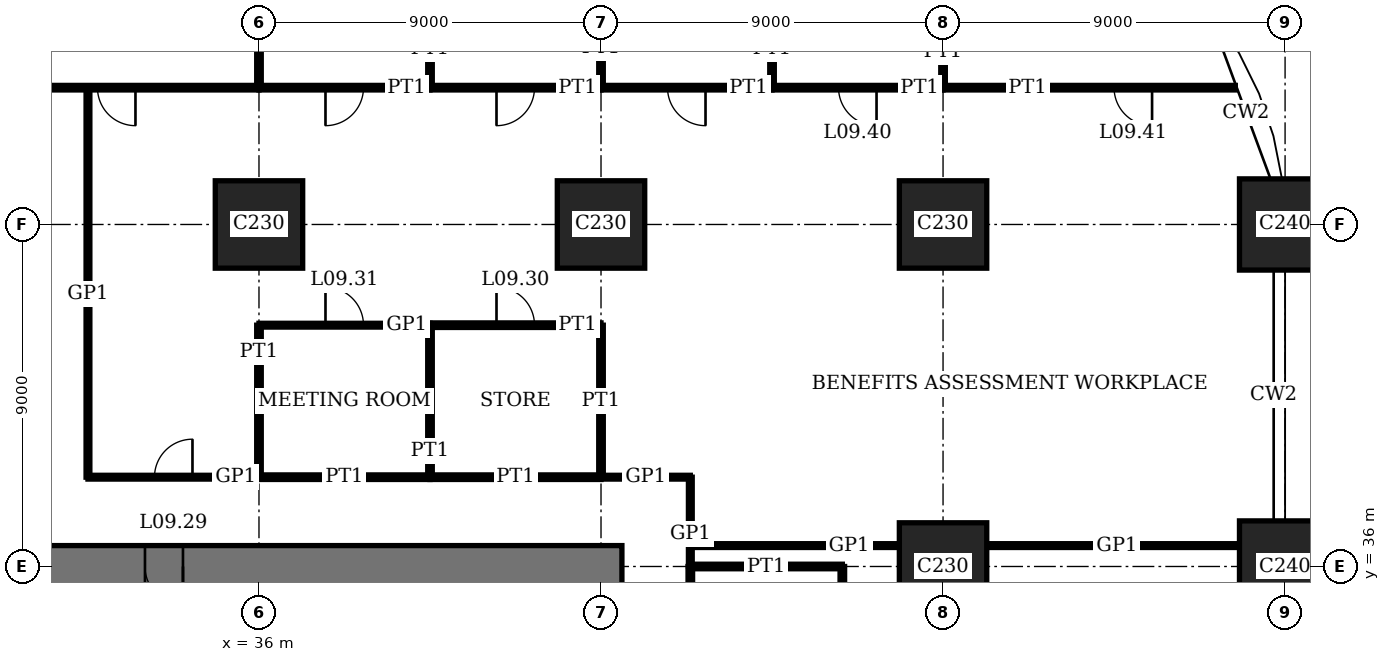
"""IFC4 building model, lengths in metres.
Left out: names, types, materials, properties, quantities, classifications, styles, units other than length and angle.
Written with IfcOpenShell. Run it as: python <this file> out.ifc"""

import sys

from ifc_helpers import new_model, si_unit, direction, frame, frame_2d, origin, origin_2d, place, context, subcontext, project, spatial, rectangle, extrude, element, fill, save


model = new_model("IFC4")
c1 = context("Model", 3, precision=1e-05, world=origin(), true_north=direction((0.0, 1.0)))
c2 = subcontext(c1, "Body", "Model", "MODEL_VIEW")
j1 = project(units=[si_unit("LENGTHUNIT", "METRE"), si_unit("PLANEANGLEUNIT", "RADIAN")], contexts=[c1])
p1 = place(None, origin())
s1 = spatial("IfcSite", under=j1, at=p1, CompositionType="ELEMENT")
p2 = place(p1, origin())
s2 = spatial("IfcBuilding", under=s1, at=p2, CompositionType="ELEMENT")
p3 = place(p2, frame((0.0, 0.0, 39.8)))
s3 = spatial("IfcBuildingStorey", under=s2, at=p3, CompositionType="ELEMENT", Elevation=39.8)
for number, where, z_axis, x_axis in (
    (1, (36.0, 45.0, 0.0), (0.0, 0.0, 1.0), (1.0, 0.0, 0.0)),
    (2, (45.0, 45.0, 0.0), (0.0, 0.0, 1.0), (1.0, 0.0, 0.0)),
    (3, (54.0, 36.0, 0.0), (0.0, 0.0, 1.0), (1.0, 0.0, 0.0)),
    (4, (54.0, 45.0, 0.0), (0.0, 0.0, 1.0), (1.0, 0.0, 0.0)),
):
    element("IfcColumn", number, at=place(p3, frame(where, z_axis=z_axis, x_axis=x_axis)), inside=s3, PredefinedType="COLUMN", context=c2, shape_type="SweptSolid", body=[
        extrude(rectangle(XDim=2.3, YDim=2.3, at=origin_2d()), origin(), (0.0, 0.0, 1.0), 4.0),
    ])
for number, where, z_axis, x_axis in (
    (5, (63.0, 36.0, 0.0), (0.0, 0.0, 1.0), (1.0, 0.0, 0.0)),
    (6, (63.0, 45.0, 0.0), (0.0, 0.0, 1.0), (1.0, 0.0, 0.0)),
):
    element("IfcColumn", number, at=place(p3, frame(where, z_axis=z_axis, x_axis=x_axis)), inside=s3, PredefinedType="COLUMN", context=c2, shape_type="SweptSolid", body=[
        extrude(rectangle(XDim=2.4, YDim=2.4, at=origin_2d()), origin(), (0.0, 0.0, 1.0), 4.0),
    ])
p4 = place(p3, frame((45.55, 36.0, 0.0), z_axis=(0.0, 0.0, 1.0), x_axis=(-1.0, 0.0, 0.0)))
e7 = element("IfcWall", 7, at=p4, inside=s3, PredefinedType="SHEAR", context=c2, shape_type="SweptSolid", body=[
    extrude(rectangle(XDim=28.1, YDim=1.1, at=frame_2d((14.05, 0.0))), origin(), (0.0, 0.0, 1.0), 4.0),
])
p5 = place(p4, frame((11.55, 0.0, 0.0)))
e8 = element("IfcOpeningElement", 8, at=p5, cuts=e7, PredefinedType="OPENING", context=c2, shape_type="SweptSolid", body=[
    extrude(rectangle(XDim=1.0, YDim=2.4, at=frame_2d((0.5, 1.2))), frame((0.0, 0.56, 0.0), z_axis=(0.0, -1.0, 0.0), x_axis=(1.0, 0.0, 0.0)), (0.0, 0.0, 1.0), 1.12),
])
p6 = place(p4, frame((16.55, 0.0, 0.0)))
e9 = element("IfcOpeningElement", 9, at=p6, cuts=e7, PredefinedType="OPENING", context=c2, shape_type="SweptSolid", body=[
    extrude(rectangle(XDim=1.0, YDim=2.4, at=frame_2d((0.5, 1.2))), frame((0.0, 0.56, 0.0), z_axis=(0.0, -1.0, 0.0), x_axis=(1.0, 0.0, 0.0)), (0.0, 0.0, 1.0), 1.12),
])
p7 = place(p4, frame((20.0, 0.0, 0.0)))
e10 = element("IfcOpeningElement", 10, at=p7, cuts=e7, PredefinedType="OPENING", context=c2, shape_type="SweptSolid", body=[
    extrude(rectangle(XDim=1.1, YDim=2.4, at=frame_2d((0.55, 1.2))), frame((0.0, 0.56, 0.0), z_axis=(0.0, -1.0, 0.0), x_axis=(1.0, 0.0, 0.0)), (0.0, 0.0, 1.0), 1.12),
])
p8 = place(p4, frame((24.05, 0.0, 0.0)))
e11 = element("IfcOpeningElement", 11, at=p8, cuts=e7, PredefinedType="OPENING", context=c2, shape_type="SweptSolid", body=[
    extrude(rectangle(XDim=1.0, YDim=2.4, at=frame_2d((0.5, 1.2))), frame((0.0, 0.56, 0.0), z_axis=(0.0, -1.0, 0.0), x_axis=(1.0, 0.0, 0.0)), (0.0, 0.0, 1.0), 1.12),
])
p9 = place(p3, frame((47.35, 36.0, 0.0), z_axis=(0.0, 0.0, 1.0), x_axis=(1.0, 0.0, 0.0)))
e12 = element("IfcWall", 12, at=p9, inside=s3, PredefinedType="PARTITIONING", context=c2, shape_type="SweptSolid", body=[
    extrude(rectangle(XDim=4.0, YDim=0.12, at=frame_2d((2.0, 0.0))), origin(), (0.0, 0.0, 1.0), 3.05),
])
p10 = place(p3, frame((47.35, 36.55, 0.0), z_axis=(0.0, 0.0, 1.0), x_axis=(1.0, 0.0, 0.0)))
e13 = element("IfcWall", 13, at=p10, inside=s3, PredefinedType="PARTITIONING", context=c2, shape_type="SweptSolid", body=[
    extrude(rectangle(XDim=5.5, YDim=0.1, at=frame_2d((2.75, 0.0))), origin(), (0.0, 0.0, 1.0), 3.75),
])
p11 = place(p3, frame((55.15, 36.55, 0.0), z_axis=(0.0, 0.0, 1.0), x_axis=(1.0, 0.0, 0.0)))
e14 = element("IfcWall", 14, at=p11, inside=s3, PredefinedType="PARTITIONING", context=c2, shape_type="SweptSolid", body=[
    extrude(rectangle(XDim=6.65, YDim=0.1, at=frame_2d((3.325, 0.0))), origin(), (0.0, 0.0, 1.0), 3.75),
])
for number, where, z_axis, x_axis in (
    (15, (36.0, 38.35, 0.0), (0.0, 0.0, 1.0), (1.0, 0.0, 0.0)),
    (16, (40.5, 38.35, 0.0), (0.0, 0.0, 1.0), (1.0, 0.0, 0.0)),
):
    element("IfcWall", number, at=place(p3, frame(where, z_axis=z_axis, x_axis=x_axis)), inside=s3, PredefinedType="PARTITIONING", context=c2, shape_type="SweptSolid", body=[
        extrude(rectangle(XDim=4.5, YDim=0.12, at=frame_2d((2.25, 0.0))), origin(), (0.0, 0.0, 1.0), 3.75),
    ])
p12 = place(p3, frame((31.5, 38.35, 0.0), z_axis=(0.0, 0.0, 1.0), x_axis=(1.0, 0.0, 0.0)))
e17 = element("IfcWall", 17, at=p12, inside=s3, PredefinedType="PARTITIONING", context=c2, shape_type="SweptSolid", body=[
    extrude(rectangle(XDim=4.5, YDim=0.1, at=frame_2d((2.25, 0.0))), origin(), (0.0, 0.0, 1.0), 3.75),
])
p13 = place(p12, frame((1.75, 0.0, 0.0)))
e18 = element("IfcOpeningElement", 18, at=p13, cuts=e17, PredefinedType="OPENING", context=c2, shape_type="SweptSolid", body=[
    extrude(rectangle(XDim=1.0, YDim=2.4, at=frame_2d((0.5, 1.2))), frame((0.0, 0.06, 0.0), z_axis=(0.0, -1.0, 0.0), x_axis=(1.0, 0.0, 0.0)), (0.0, 0.0, 1.0), 0.12),
])
p14 = place(p3, frame((45.0, 38.35, 0.0), z_axis=(0.0, 0.0, 1.0), x_axis=(1.0, 0.0, 0.0)))
e19 = element("IfcWall", 19, at=p14, inside=s3, PredefinedType="PARTITIONING", context=c2, shape_type="SweptSolid", body=[
    extrude(rectangle(XDim=2.35, YDim=0.1, at=frame_2d((1.175, 0.0))), origin(), (0.0, 0.0, 1.0), 3.75),
])
p15 = place(p3, frame((40.5, 42.35, 0.0), z_axis=(0.0, 0.0, 1.0), x_axis=(1.0, 0.0, 0.0)))
e20 = element("IfcWall", 20, at=p15, inside=s3, PredefinedType="PARTITIONING", context=c2, shape_type="SweptSolid", body=[
    extrude(rectangle(XDim=4.5, YDim=0.12, at=frame_2d((2.25, 0.0))), origin(), (0.0, 0.0, 1.0), 3.75),
])
p16 = place(p15, frame((1.75, 0.0, 0.0)))
e21 = element("IfcOpeningElement", 21, at=p16, cuts=e20, PredefinedType="OPENING", context=c2, shape_type="SweptSolid", body=[
    extrude(rectangle(XDim=1.0, YDim=2.4, at=frame_2d((0.5, 1.2))), frame((0.0, 0.07, 0.0), z_axis=(0.0, -1.0, 0.0), x_axis=(1.0, 0.0, 0.0)), (0.0, 0.0, 1.0), 0.14),
])
p17 = place(p3, frame((36.0, 42.35, 0.0), z_axis=(0.0, 0.0, 1.0), x_axis=(1.0, 0.0, 0.0)))
e22 = element("IfcWall", 22, at=p17, inside=s3, PredefinedType="PARTITIONING", context=c2, shape_type="SweptSolid", body=[
    extrude(rectangle(XDim=4.5, YDim=0.1, at=frame_2d((2.25, 0.0))), origin(), (0.0, 0.0, 1.0), 3.75),
])
p18 = place(p17, frame((1.75, 0.0, 0.0)))
e23 = element("IfcOpeningElement", 23, at=p18, cuts=e22, PredefinedType="OPENING", context=c2, shape_type="SweptSolid", body=[
    extrude(rectangle(XDim=1.0, YDim=2.4, at=frame_2d((0.5, 1.2))), frame((0.0, 0.06, 0.0), z_axis=(0.0, -1.0, 0.0), x_axis=(1.0, 0.0, 0.0)), (0.0, 0.0, 1.0), 0.12),
])
p19 = place(p3, frame((27.0, 48.6, 0.0), z_axis=(0.0, 0.0, 1.0), x_axis=(1.0, 0.0, 0.0)))
e24 = element("IfcWall", 24, at=p19, inside=s3, PredefinedType="PARTITIONING", context=c2, shape_type="SweptSolid", body=[
    extrude(rectangle(XDim=9.0, YDim=0.12, at=frame_2d((4.5, 0.0))), origin(), (0.0, 0.0, 1.0), 3.75),
])
p20 = place(p19, frame((4.75, 0.0, 0.0)))
e25 = element("IfcOpeningElement", 25, at=p20, cuts=e24, PredefinedType="OPENING", context=c2, shape_type="SweptSolid", body=[
    extrude(rectangle(XDim=1.0, YDim=2.4, at=frame_2d((0.5, 1.2))), frame((0.0, 0.07, 0.0), z_axis=(0.0, -1.0, 0.0), x_axis=(1.0, 0.0, 0.0)), (0.0, 0.0, 1.0), 0.14),
])
p21 = place(p3, frame((36.0, 48.6, 0.0), z_axis=(0.0, 0.0, 1.0), x_axis=(1.0, 0.0, 0.0)))
e26 = element("IfcWall", 26, at=p21, inside=s3, PredefinedType="PARTITIONING", context=c2, shape_type="SweptSolid", body=[
    extrude(rectangle(XDim=4.5, YDim=0.12, at=frame_2d((2.25, 0.0))), origin(), (0.0, 0.0, 1.0), 3.75),
])
p22 = place(p21, frame((1.75, 0.0, 0.0)))
e27 = element("IfcOpeningElement", 27, at=p22, cuts=e26, PredefinedType="OPENING", context=c2, shape_type="SweptSolid", body=[
    extrude(rectangle(XDim=1.0, YDim=2.4, at=frame_2d((0.5, 1.2))), frame((0.0, 0.07, 0.0), z_axis=(0.0, -1.0, 0.0), x_axis=(1.0, 0.0, 0.0)), (0.0, 0.0, 1.0), 0.14),
])
p23 = place(p3, frame((40.5, 48.6, 0.0), z_axis=(0.0, 0.0, 1.0), x_axis=(1.0, 0.0, 0.0)))
e28 = element("IfcWall", 28, at=p23, inside=s3, PredefinedType="PARTITIONING", context=c2, shape_type="SweptSolid", body=[
    extrude(rectangle(XDim=4.5, YDim=0.12, at=frame_2d((2.25, 0.0))), origin(), (0.0, 0.0, 1.0), 3.75),
])
p24 = place(p23, frame((1.75, 0.0, 0.0)))
e29 = element("IfcOpeningElement", 29, at=p24, cuts=e28, PredefinedType="OPENING", context=c2, shape_type="SweptSolid", body=[
    extrude(rectangle(XDim=1.0, YDim=2.4, at=frame_2d((0.5, 1.2))), frame((0.0, 0.07, 0.0), z_axis=(0.0, -1.0, 0.0), x_axis=(1.0, 0.0, 0.0)), (0.0, 0.0, 1.0), 0.14),
])
p25 = place(p3, frame((45.0, 48.6, 0.0), z_axis=(0.0, 0.0, 1.0), x_axis=(1.0, 0.0, 0.0)))
e30 = element("IfcWall", 30, at=p25, inside=s3, PredefinedType="PARTITIONING", context=c2, shape_type="SweptSolid", body=[
    extrude(rectangle(XDim=4.5, YDim=0.12, at=frame_2d((2.25, 0.0))), origin(), (0.0, 0.0, 1.0), 3.75),
])
p26 = place(p25, frame((1.75, 0.0, 0.0)))
e31 = element("IfcOpeningElement", 31, at=p26, cuts=e30, PredefinedType="OPENING", context=c2, shape_type="SweptSolid", body=[
    extrude(rectangle(XDim=1.0, YDim=2.4, at=frame_2d((0.5, 1.2))), frame((0.0, 0.07, 0.0), z_axis=(0.0, -1.0, 0.0), x_axis=(1.0, 0.0, 0.0)), (0.0, 0.0, 1.0), 0.14),
])
p27 = place(p3, frame((49.5, 48.6, 0.0), z_axis=(0.0, 0.0, 1.0), x_axis=(1.0, 0.0, 0.0)))
e32 = element("IfcWall", 32, at=p27, inside=s3, PredefinedType="PARTITIONING", context=c2, shape_type="SweptSolid", body=[
    extrude(rectangle(XDim=4.5, YDim=0.12, at=frame_2d((2.25, 0.0))), origin(), (0.0, 0.0, 1.0), 3.75),
])
p28 = place(p27, frame((1.75, 0.0, 0.0)))
e33 = element("IfcOpeningElement", 33, at=p28, cuts=e32, PredefinedType="OPENING", context=c2, shape_type="SweptSolid", body=[
    extrude(rectangle(XDim=1.0, YDim=2.4, at=frame_2d((0.5, 1.2))), frame((0.0, 0.07, 0.0), z_axis=(0.0, -1.0, 0.0), x_axis=(1.0, 0.0, 0.0)), (0.0, 0.0, 1.0), 0.14),
])
p29 = place(p3, frame((54.0, 48.6, 0.0), z_axis=(0.0, 0.0, 1.0), x_axis=(1.0, 0.0, 0.0)))
e34 = element("IfcWall", 34, at=p29, inside=s3, PredefinedType="PARTITIONING", context=c2, shape_type="SweptSolid", body=[
    extrude(rectangle(XDim=7.69, YDim=0.12, at=frame_2d((3.845, 0.0))), origin(), (0.0, 0.0, 1.0), 3.75),
])
p30 = place(p29, frame((4.5, 0.0, 0.0)))
e35 = element("IfcOpeningElement", 35, at=p30, cuts=e34, PredefinedType="OPENING", context=c2, shape_type="SweptSolid", body=[
    extrude(rectangle(XDim=1.0, YDim=2.4, at=frame_2d((0.5, 1.2))), frame((0.0, 0.07, 0.0), z_axis=(0.0, -1.0, 0.0), x_axis=(1.0, 0.0, 0.0)), (0.0, 0.0, 1.0), 0.14),
])
p31 = place(p3, frame((31.5, 38.35, 0.0), z_axis=(0.0, 0.0, 1.0), x_axis=(0.0, 1.0, 0.0)))
e36 = element("IfcWall", 36, at=p31, inside=s3, PredefinedType="PARTITIONING", context=c2, shape_type="SweptSolid", body=[
    extrude(rectangle(XDim=10.26, YDim=0.1, at=frame_2d((5.13, 0.0))), origin(), (0.0, 0.0, 1.0), 3.75),
])
p32 = place(p3, frame((36.0, 48.6, 0.0), z_axis=(0.0, 0.0, 1.0), x_axis=(0.0, 1.0, 0.0)))
e37 = element("IfcWall", 37, at=p32, inside=s3, PredefinedType="PARTITIONING", context=c2, shape_type="SweptSolid", body=[
    extrude(rectangle(XDim=4.2, YDim=0.12, at=frame_2d((2.1, 0.0))), origin(), (0.0, 0.0, 1.0), 3.05),
])
p33 = place(p3, frame((36.0, 38.35, 0.0), z_axis=(0.0, 0.0, 1.0), x_axis=(0.0, 1.0, 0.0)))
e38 = element("IfcWall", 38, at=p33, inside=s3, PredefinedType="PARTITIONING", context=c2, shape_type="SweptSolid", body=[
    extrude(rectangle(XDim=4.0, YDim=0.12, at=frame_2d((2.0, 0.0))), origin(), (0.0, 0.0, 1.0), 3.05),
])
p34 = place(p3, frame((40.5, 48.6, 0.0), z_axis=(0.0, 0.0, 1.0), x_axis=(0.0, 1.0, 0.0)))
e39 = element("IfcWall", 39, at=p34, inside=s3, PredefinedType="PARTITIONING", context=c2, shape_type="SweptSolid", body=[
    extrude(rectangle(XDim=5.09, YDim=0.12, at=frame_2d((2.545, 0.0))), origin(), (0.0, 0.0, 1.0), 3.75),
])
p35 = place(p3, frame((40.5, 38.35, 0.0), z_axis=(0.0, 0.0, 1.0), x_axis=(0.0, 1.0, 0.0)))
e40 = element("IfcWall", 40, at=p35, inside=s3, PredefinedType="PARTITIONING", context=c2, shape_type="SweptSolid", body=[
    extrude(rectangle(XDim=4.0, YDim=0.12, at=frame_2d((2.0, 0.0))), origin(), (0.0, 0.0, 1.0), 3.75),
])
p36 = place(p3, frame((45.0, 48.6, 0.0), z_axis=(0.0, 0.0, 1.0), x_axis=(0.0, 1.0, 0.0)))
e41 = element("IfcWall", 41, at=p36, inside=s3, PredefinedType="PARTITIONING", context=c2, shape_type="SweptSolid", body=[
    extrude(rectangle(XDim=4.2, YDim=0.12, at=frame_2d((2.1, 0.0))), origin(), (0.0, 0.0, 1.0), 3.05),
])
p37 = place(p3, frame((45.0, 38.35, 0.0), z_axis=(0.0, 0.0, 1.0), x_axis=(0.0, 1.0, 0.0)))
e42 = element("IfcWall", 42, at=p37, inside=s3, PredefinedType="PARTITIONING", context=c2, shape_type="SweptSolid", body=[
    extrude(rectangle(XDim=4.0, YDim=0.12, at=frame_2d((2.0, 0.0))), origin(), (0.0, 0.0, 1.0), 3.05),
])
p38 = place(p3, frame((47.35, 31.5, 0.0), z_axis=(0.0, 0.0, 1.0), x_axis=(0.0, 1.0, 0.0)))
e43 = element("IfcWall", 43, at=p38, inside=s3, PredefinedType="PARTITIONING", context=c2, shape_type="SweptSolid", body=[
    extrude(rectangle(XDim=4.5, YDim=0.12, at=frame_2d((2.25, 0.0))), origin(), (0.0, 0.0, 1.0), 3.75),
])
p39 = place(p3, frame((47.35, 36.0, 0.0), z_axis=(0.0, 0.0, 1.0), x_axis=(0.0, 1.0, 0.0)))
e44 = element("IfcWall", 44, at=p39, inside=s3, PredefinedType="PARTITIONING", context=c2, shape_type="SweptSolid", body=[
    extrude(rectangle(XDim=2.35, YDim=0.1, at=frame_2d((1.175, 0.0))), origin(), (0.0, 0.0, 1.0), 3.75),
])
p40 = place(p3, frame((49.5, 48.6, 0.0), z_axis=(0.0, 0.0, 1.0), x_axis=(0.0, 1.0, 0.0)))
e45 = element("IfcWall", 45, at=p40, inside=s3, PredefinedType="PARTITIONING", context=c2, shape_type="SweptSolid", body=[
    extrude(rectangle(XDim=5.09, YDim=0.12, at=frame_2d((2.545, 0.0))), origin(), (0.0, 0.0, 1.0), 3.75),
])
p41 = place(p3, frame((51.35, 31.5, 0.0), z_axis=(0.0, 0.0, 1.0), x_axis=(0.0, 1.0, 0.0)))
e46 = element("IfcWall", 46, at=p41, inside=s3, PredefinedType="PARTITIONING", context=c2, shape_type="SweptSolid", body=[
    extrude(rectangle(XDim=4.5, YDim=0.12, at=frame_2d((2.25, 0.0))), origin(), (0.0, 0.0, 1.0), 3.75),
])
p42 = place(p41, frame((1.75, 0.0, 0.0)))
e47 = element("IfcOpeningElement", 47, at=p42, cuts=e46, PredefinedType="OPENING", context=c2, shape_type="SweptSolid", body=[
    extrude(rectangle(XDim=1.0, YDim=2.4, at=frame_2d((0.5, 1.2))), frame((0.0, 0.07, 0.0), z_axis=(0.0, -1.0, 0.0), x_axis=(1.0, 0.0, 0.0)), (0.0, 0.0, 1.0), 0.14),
])
p43 = place(p3, frame((54.0, 48.6, 0.0), z_axis=(0.0, 0.0, 1.0), x_axis=(0.0, 1.0, 0.0)))
e48 = element("IfcWall", 48, at=p43, inside=s3, PredefinedType="PARTITIONING", context=c2, shape_type="SweptSolid", body=[
    extrude(rectangle(XDim=4.2, YDim=0.12, at=frame_2d((2.1, 0.0))), origin(), (0.0, 0.0, 1.0), 3.05),
])
p44 = place(p5, origin())
e49 = element("IfcDoor", 49, at=p44, inside=s3, OperationType="SINGLE_SWING_RIGHT", PredefinedType="DOOR", context=c2, shape_type="SweptSolid", body=[
    extrude(rectangle(XDim=1.0, YDim=2.4, at=frame_2d((0.5, 1.2))), frame((0.0, 0.025, 0.0), z_axis=(0.0, -1.0, 0.0), x_axis=(1.0, 0.0, 0.0)), (0.0, 0.0, 1.0), 0.05),
    extrude(rectangle(XDim=0.04, YDim=2.4, at=frame_2d((0.02, 1.2))), frame((0.0, 0.4, 0.0), z_axis=(0.0, -1.0, 0.0), x_axis=(1.0, 0.0, 0.0)), (0.0, 0.0, 1.0), 0.8),
    extrude(rectangle(XDim=0.04, YDim=2.4, at=frame_2d((0.98, 1.2))), frame((0.0, 0.4, 0.0), z_axis=(0.0, -1.0, 0.0), x_axis=(1.0, 0.0, 0.0)), (0.0, 0.0, 1.0), 0.8),
    extrude(rectangle(XDim=1.0, YDim=0.04, at=frame_2d((0.5, 2.38))), frame((0.0, 0.4, 0.0), z_axis=(0.0, -1.0, 0.0), x_axis=(1.0, 0.0, 0.0)), (0.0, 0.0, 1.0), 0.8),
])
fill(e8, e49)
p45 = place(p13, origin())
e50 = element("IfcDoor", 50, at=p45, inside=s3, OperationType="SINGLE_SWING_LEFT", PredefinedType="DOOR", context=c2, shape_type="SweptSolid", body=[
    extrude(rectangle(XDim=1.0, YDim=2.4, at=frame_2d((0.5, 1.2))), frame((0.0, 0.02, 0.0), z_axis=(0.0, -1.0, 0.0), x_axis=(1.0, 0.0, 0.0)), (0.0, 0.0, 1.0), 0.04),
])
fill(e18, e50)
p46 = place(p16, origin())
e51 = element("IfcDoor", 51, at=p46, inside=s3, OperationType="SINGLE_SWING_RIGHT", PredefinedType="DOOR", context=c2, shape_type="SweptSolid", body=[
    extrude(rectangle(XDim=1.0, YDim=2.4, at=frame_2d((0.5, 1.2))), frame((0.0, 0.025, 0.0), z_axis=(0.0, -1.0, 0.0), x_axis=(1.0, 0.0, 0.0)), (0.0, 0.0, 1.0), 0.05),
])
fill(e21, e51)
p47 = place(p18, origin())
e52 = element("IfcDoor", 52, at=p47, inside=s3, OperationType="SINGLE_SWING_RIGHT", PredefinedType="DOOR", context=c2, shape_type="SweptSolid", body=[
    extrude(rectangle(XDim=1.0, YDim=2.4, at=frame_2d((0.5, 1.2))), frame((0.0, 0.02, 0.0), z_axis=(0.0, -1.0, 0.0), x_axis=(1.0, 0.0, 0.0)), (0.0, 0.0, 1.0), 0.04),
])
fill(e23, e52)
p48 = place(p20, origin())
e53 = element("IfcDoor", 53, at=p48, inside=s3, OperationType="SINGLE_SWING_RIGHT", PredefinedType="DOOR", context=c2, shape_type="SweptSolid", body=[
    extrude(rectangle(XDim=1.0, YDim=2.4, at=frame_2d((0.5, 1.2))), frame((0.0, 0.025, 0.0), z_axis=(0.0, -1.0, 0.0), x_axis=(1.0, 0.0, 0.0)), (0.0, 0.0, 1.0), 0.05),
])
fill(e25, e53)
p49 = place(p22, origin())
e54 = element("IfcDoor", 54, at=p49, inside=s3, OperationType="SINGLE_SWING_LEFT", PredefinedType="DOOR", context=c2, shape_type="SweptSolid", body=[
    extrude(rectangle(XDim=1.0, YDim=2.4, at=frame_2d((0.5, 1.2))), frame((0.0, 0.025, 0.0), z_axis=(0.0, -1.0, 0.0), x_axis=(1.0, 0.0, 0.0)), (0.0, 0.0, 1.0), 0.05),
])
fill(e27, e54)
p50 = place(p24, origin())
e55 = element("IfcDoor", 55, at=p50, inside=s3, OperationType="SINGLE_SWING_LEFT", PredefinedType="DOOR", context=c2, shape_type="SweptSolid", body=[
    extrude(rectangle(XDim=1.0, YDim=2.4, at=frame_2d((0.5, 1.2))), frame((0.0, 0.025, 0.0), z_axis=(0.0, -1.0, 0.0), x_axis=(1.0, 0.0, 0.0)), (0.0, 0.0, 1.0), 0.05),
])
fill(e29, e55)
p51 = place(p26, origin())
e56 = element("IfcDoor", 56, at=p51, inside=s3, OperationType="SINGLE_SWING_RIGHT", PredefinedType="DOOR", context=c2, shape_type="SweptSolid", body=[
    extrude(rectangle(XDim=1.0, YDim=2.4, at=frame_2d((0.5, 1.2))), frame((0.0, 0.025, 0.0), z_axis=(0.0, -1.0, 0.0), x_axis=(1.0, 0.0, 0.0)), (0.0, 0.0, 1.0), 0.05),
])
fill(e31, e56)
p52 = place(p28, origin())
e57 = element("IfcDoor", 57, at=p52, inside=s3, OperationType="SINGLE_SWING_RIGHT", PredefinedType="DOOR", context=c2, shape_type="SweptSolid", body=[
    extrude(rectangle(XDim=1.0, YDim=2.4, at=frame_2d((0.5, 1.2))), frame((0.0, 0.025, 0.0), z_axis=(0.0, -1.0, 0.0), x_axis=(1.0, 0.0, 0.0)), (0.0, 0.0, 1.0), 0.05),
])
fill(e33, e57)
p53 = place(p30, origin())
e58 = element("IfcDoor", 58, at=p53, inside=s3, OperationType="SINGLE_SWING_RIGHT", PredefinedType="DOOR", context=c2, shape_type="SweptSolid", body=[
    extrude(rectangle(XDim=1.0, YDim=2.4, at=frame_2d((0.5, 1.2))), frame((0.0, 0.025, 0.0), z_axis=(0.0, -1.0, 0.0), x_axis=(1.0, 0.0, 0.0)), (0.0, 0.0, 1.0), 0.05),
])
fill(e35, e58)
save(model, sys.argv[1])
